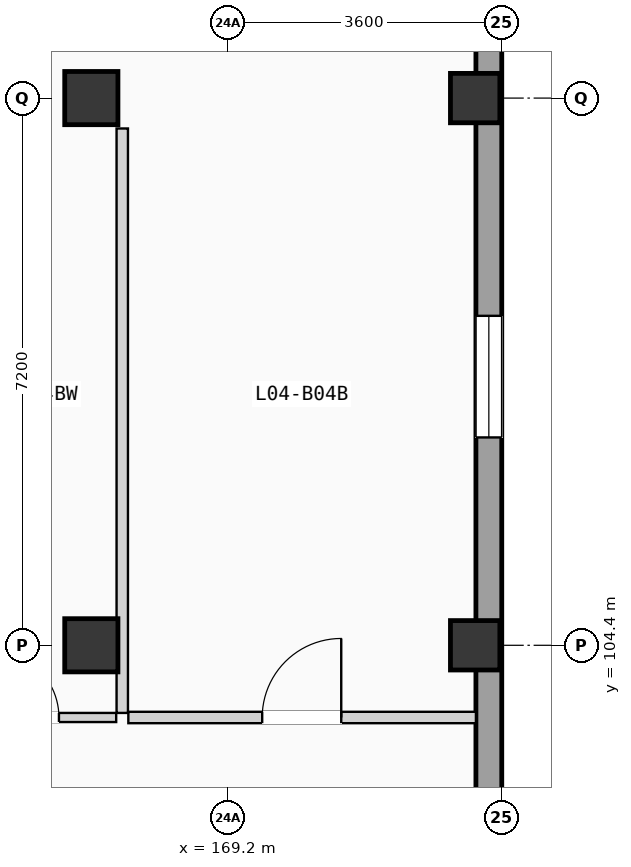
"""IFC4 building model, lengths in metres.
Left out: names, types, materials, properties, quantities, classifications, styles, units other than length and angle.
Written with IfcOpenShell. Run it as: python <this file> out.ifc"""

import sys

from ifc_helpers import new_model, si_unit, direction, frame, frame_2d, origin, origin_2d, place, context, subcontext, project, spatial, rectangle, extrude, element, fill, save


model = new_model("IFC4")
c1 = context("Model", 3, precision=1e-05, world=origin(), true_north=direction((0.0, 1.0)))
c2 = subcontext(c1, "Body", "Model", "MODEL_VIEW")
j1 = project(units=[si_unit("LENGTHUNIT", "METRE"), si_unit("PLANEANGLEUNIT", "RADIAN")], contexts=[c1])
p1 = place(None, origin())
s1 = spatial("IfcSite", under=j1, at=p1, CompositionType="ELEMENT")
p2 = place(p1, origin())
s2 = spatial("IfcBuilding", under=s1, at=p2, CompositionType="ELEMENT")
p3 = place(p2, frame((0.0, 0.0, 15.225)))
s3 = spatial("IfcBuildingStorey", under=s2, at=p3, CompositionType="ELEMENT", Elevation=15.225)
for number, where, z_axis, x_axis in (
    (1, (167.4, 104.4, 0.0), (0.0, 0.0, 1.0), (1.0, 0.0, 0.0)),
    (2, (167.4, 111.6, 0.0), (0.0, 0.0, 1.0), (1.0, 0.0, 0.0)),
):
    element("IfcColumn", number, at=place(p3, frame(where, z_axis=z_axis, x_axis=x_axis)), inside=s3, PredefinedType="COLUMN", context=c2, shape_type="SweptSolid", body=[
        extrude(rectangle(XDim=0.7, YDim=0.7, at=origin_2d()), origin(), (0.0, 0.0, 1.0), 3.15),
    ])
for number, where, z_axis, x_axis in (
    (3, (172.45, 104.4, 0.0), (0.0, 0.0, 1.0), (1.0, 0.0, 0.0)),
    (4, (172.45, 111.6, 0.0), (0.0, 0.0, 1.0), (1.0, 0.0, 0.0)),
):
    element("IfcColumn", number, at=place(p3, frame(where, z_axis=z_axis, x_axis=x_axis)), inside=s3, PredefinedType="COLUMN", context=c2, shape_type="SweptSolid", body=[
        extrude(rectangle(XDim=0.65, YDim=0.65, at=origin_2d()), origin(), (0.0, 0.0, 1.0), 3.15),
    ])
p4 = place(p3, frame((172.63, 68.74, 0.0), z_axis=(0.0, 0.0, 1.0), x_axis=(0.0, 1.0, 0.0)))
e5 = element("IfcWall", 5, at=p4, inside=s3, PredefinedType="SOLIDWALL", context=c2, shape_type="SweptSolid", body=[
    extrude(rectangle(XDim=49.72, YDim=0.34, at=frame_2d((24.86, 0.0))), origin(), (0.0, 0.0, 1.0), 2.89),
])
p5 = place(p4, frame((15.085, 0.0, 0.705)))
e6 = element("IfcOpeningElement", 6, at=p5, cuts=e5, PredefinedType="OPENING", context=c2, shape_type="SweptSolid", body=[
    extrude(rectangle(XDim=1.48, YDim=1.5, at=frame_2d((0.74, 0.75))), frame((0.0, 0.18, 0.0), z_axis=(0.0, -1.0, 0.0), x_axis=(1.0, 0.0, 0.0)), (0.0, 0.0, 1.0), 0.36),
])
p6 = place(p4, frame((8.758, 0.0, 0.555)))
e7 = element("IfcOpeningElement", 7, at=p6, cuts=e5, PredefinedType="OPENING", context=c2, shape_type="SweptSolid", body=[
    extrude(rectangle(XDim=1.48, YDim=1.65, at=frame_2d((0.74, 0.825))), frame((0.0, 0.18, 0.0), z_axis=(0.0, -1.0, 0.0), x_axis=(1.0, 0.0, 0.0)), (0.0, 0.0, 1.0), 0.36),
])
p7 = place(p4, frame((18.76, 0.0, 0.85)))
e8 = element("IfcOpeningElement", 8, at=p7, cuts=e5, PredefinedType="OPENING", context=c2, shape_type="SweptSolid", body=[
    extrude(rectangle(XDim=0.95, YDim=1.2, at=frame_2d((0.475, 0.6))), frame((0.0, 0.18, 0.0), z_axis=(0.0, -1.0, 0.0), x_axis=(1.0, 0.0, 0.0)), (0.0, 0.0, 1.0), 0.36),
])
p8 = place(p4, frame((31.26, 0.0, 0.9)))
e9 = element("IfcOpeningElement", 9, at=p8, cuts=e5, PredefinedType="OPENING", context=c2, shape_type="SweptSolid", body=[
    extrude(rectangle(XDim=1.6, YDim=1.2, at=frame_2d((0.8, 0.6))), frame((0.0, 0.18, 0.0), z_axis=(0.0, -1.0, 0.0), x_axis=(1.0, 0.0, 0.0)), (0.0, 0.0, 1.0), 0.36),
])
p9 = place(p4, frame((24.362, 0.0, 0.855)))
e10 = element("IfcOpeningElement", 10, at=p9, cuts=e5, PredefinedType="OPENING", context=c2, shape_type="SweptSolid", body=[
    extrude(rectangle(XDim=1.6, YDim=1.35, at=frame_2d((0.8, 0.675))), frame((0.0, 0.18, 0.0), z_axis=(0.0, -1.0, 0.0), x_axis=(1.0, 0.0, 0.0)), (0.0, 0.0, 1.0), 0.36),
])
p10 = place(p4, frame((38.395, 0.0, 0.705)))
e11 = element("IfcOpeningElement", 11, at=p10, cuts=e5, PredefinedType="OPENING", context=c2, shape_type="SweptSolid", body=[
    extrude(rectangle(XDim=1.6, YDim=1.5, at=frame_2d((0.8, 0.75))), frame((0.0, 0.18, 0.0), z_axis=(0.0, -1.0, 0.0), x_axis=(1.0, 0.0, 0.0)), (0.0, 0.0, 1.0), 0.36),
])
p11 = place(p3, frame((167.887, 103.45, 0.0), z_axis=(0.0, 0.0, 1.0), x_axis=(1.0, 0.0, 0.0)))
e12 = element("IfcWall", 12, at=p11, inside=s3, PredefinedType="PARTITIONING", context=c2, shape_type="SweptSolid", body=[
    extrude(rectangle(XDim=4.573, YDim=0.15, at=frame_2d((2.287, 0.0))), origin(), (0.0, 0.0, 1.0), 2.87),
])
p12 = place(p11, frame((1.761, 0.0, 0.0)))
e13 = element("IfcOpeningElement", 13, at=p12, cuts=e12, PredefinedType="OPENING", context=c2, shape_type="SweptSolid", body=[
    extrude(rectangle(XDim=1.04, YDim=2.08, at=frame_2d((0.52, 1.04))), frame((0.0, 0.085, 0.0), z_axis=(0.0, -1.0, 0.0), x_axis=(1.0, 0.0, 0.0)), (0.0, 0.0, 1.0), 0.17),
])
p13 = place(p3, frame((165.34, 103.45, 0.0), z_axis=(0.0, 0.0, 1.0), x_axis=(1.0, 0.0, 0.0)))
e14 = element("IfcWall", 14, at=p13, inside=s3, PredefinedType="PARTITIONING", context=c2, shape_type="SweptSolid", body=[
    extrude(rectangle(XDim=2.387, YDim=0.12, at=frame_2d((1.193, 0.0))), origin(), (0.0, 0.0, 1.0), 2.87),
])
p14 = place(p13, frame((0.754, 0.0, 0.0)))
e15 = element("IfcOpeningElement", 15, at=p14, cuts=e14, PredefinedType="OPENING", context=c2, shape_type="SweptSolid", body=[
    extrude(rectangle(XDim=0.88, YDim=2.02, at=frame_2d((0.44, 1.01))), frame((0.0, 0.07, 0.0), z_axis=(0.0, -1.0, 0.0), x_axis=(1.0, 0.0, 0.0)), (0.0, 0.0, 1.0), 0.14),
])
p15 = place(p3, frame((167.807, 103.51, 0.0), z_axis=(0.0, 0.0, 1.0), x_axis=(0.0, 1.0, 0.0)))
e16 = element("IfcWall", 16, at=p15, inside=s3, PredefinedType="PARTITIONING", context=c2, shape_type="SweptSolid", body=[
    extrude(rectangle(XDim=7.69, YDim=0.15, at=frame_2d((3.845, 0.0))), origin(), (0.0, 0.0, 1.0), 2.87),
])
p16 = place(p10, origin())
e17 = element("IfcWindow", 17, at=p16, inside=s3, PartitioningType="DOUBLE_PANEL_VERTICAL", PredefinedType="WINDOW", context=c2, shape_type="SweptSolid", body=[
    extrude(rectangle(XDim=1.6, YDim=1.5, at=frame_2d((0.8, 0.75))), frame((0.0, 0.03, 0.0), z_axis=(0.0, -1.0, 0.0), x_axis=(1.0, 0.0, 0.0)), (0.0, 0.0, 1.0), 0.06),
])
fill(e11, e17)
p17 = place(p12, origin())
e18 = element("IfcDoor", 18, at=p17, inside=s3, OperationType="SINGLE_SWING_RIGHT", PredefinedType="DOOR", context=c2, shape_type="SweptSolid", body=[
    extrude(rectangle(XDim=1.04, YDim=2.08, at=frame_2d((0.52, 1.04))), frame((0.0, 0.025, 0.0), z_axis=(0.0, -1.0, 0.0), x_axis=(1.0, 0.0, 0.0)), (0.0, 0.0, 1.0), 0.05),
])
fill(e13, e18)
p18 = place(p14, origin())
e19 = element("IfcDoor", 19, at=p18, inside=s3, OperationType="SINGLE_SWING_LEFT", PredefinedType="DOOR", context=c2, shape_type="SweptSolid", body=[
    extrude(rectangle(XDim=0.88, YDim=2.02, at=frame_2d((0.44, 1.01))), frame((0.0, 0.025, 0.0), z_axis=(0.0, -1.0, 0.0), x_axis=(1.0, 0.0, 0.0)), (0.0, 0.0, 1.0), 0.05),
])
fill(e15, e19)
save(model, sys.argv[1])
